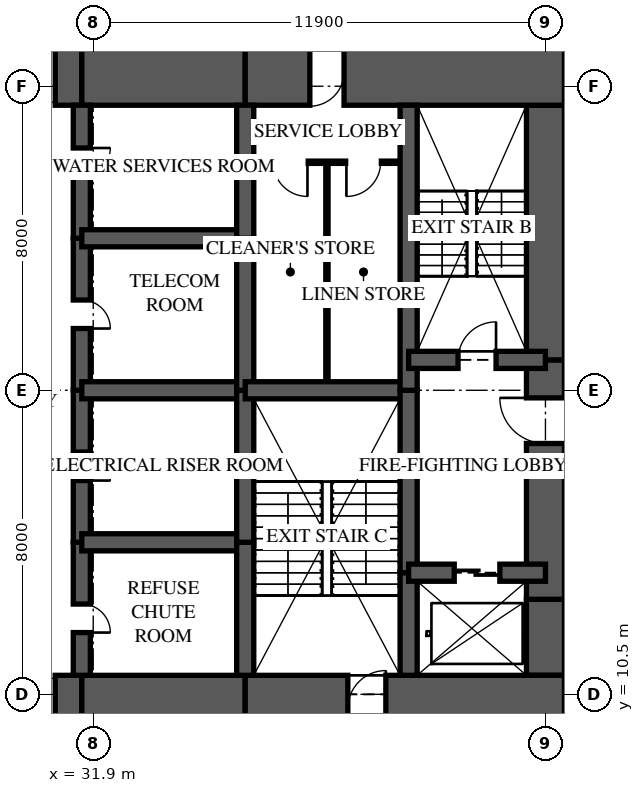
"""IFC4 building model, lengths in metres.
Left out: names, types, materials, properties, quantities, classifications, styles, units other than length and angle.
Written with IfcOpenShell. Run it as: python <this file> out.ifc"""

import sys

from ifc_helpers import new_model, si_unit, direction, frame, frame_2d, origin, place, context, subcontext, project, spatial, rectangle, extrude, element, fill, save


model = new_model("IFC4")
c1 = context("Model", 3, precision=1e-05, world=origin(), true_north=direction((0.0, 1.0)))
c2 = subcontext(c1, "Body", "Model", "MODEL_VIEW")
j1 = project(units=[si_unit("LENGTHUNIT", "METRE"), si_unit("PLANEANGLEUNIT", "RADIAN")], contexts=[c1])
p1 = place(None, origin())
s1 = spatial("IfcSite", under=j1, at=p1, CompositionType="ELEMENT")
p2 = place(p1, origin())
s2 = spatial("IfcBuilding", under=s1, at=p2, CompositionType="ELEMENT")
p3 = place(p2, frame((0.0, 0.0, 6.0)))
s3 = spatial("IfcBuildingStorey", under=s2, at=p3, CompositionType="ELEMENT", Elevation=6.0)
p4 = place(p3, frame((26.0, 10.125, 0.0), z_axis=(0.0, 0.0, 1.0), x_axis=(1.0, 0.0, 0.0)))
e1 = element("IfcWall", 1, at=p4, inside=s3, PredefinedType="SHEAR", context=c2, shape_type="SweptSolid", body=[
    extrude(rectangle(XDim=5.6, YDim=1.75, at=frame_2d((2.8, 0.0))), origin(), (0.0, 0.0, 1.0), 5.0),
])
p5 = place(p4, frame((3.3, 0.0, 0.0)))
e2 = element("IfcOpeningElement", 2, at=p5, cuts=e1, PredefinedType="OPENING", context=c2, shape_type="SweptSolid", body=[
    extrude(rectangle(XDim=1.6, YDim=2.1, at=frame_2d((0.8, 1.05))), frame((0.0, 0.885, 0.0), z_axis=(0.0, -1.0, 0.0), x_axis=(1.0, 0.0, 0.0)), (0.0, 0.0, 1.0), 1.77),
])
p6 = place(p3, frame((31.6, 10.125, 0.0), z_axis=(0.0, 0.0, 1.0), x_axis=(1.0, 0.0, 0.0)))
e3 = element("IfcWall", 3, at=p6, inside=s3, PredefinedType="SHEAR", context=c2, shape_type="SweptSolid", body=[
    extrude(rectangle(XDim=4.3, YDim=1.75, at=frame_2d((2.15, 0.0))), origin(), (0.0, 0.0, 1.0), 5.0),
])
p7 = place(p3, frame((35.9, 10.125, 0.0), z_axis=(0.0, 0.0, 1.0), x_axis=(1.0, 0.0, 0.0)))
e4 = element("IfcWall", 4, at=p7, inside=s3, PredefinedType="SHEAR", context=c2, shape_type="SweptSolid", body=[
    extrude(rectangle(XDim=8.4, YDim=1.75, at=frame_2d((4.2, 0.0))), origin(), (0.0, 0.0, 1.0), 5.0),
])
p8 = place(p7, frame((2.7, 0.0, 0.0)))
e5 = element("IfcOpeningElement", 5, at=p8, cuts=e4, PredefinedType="OPENING", context=c2, shape_type="SweptSolid", body=[
    extrude(rectangle(XDim=1.0, YDim=2.1, at=frame_2d((0.5, 1.05))), frame((0.0, 0.885, 0.0), z_axis=(0.0, -1.0, 0.0), x_axis=(1.0, 0.0, 0.0)), (0.0, 0.0, 1.0), 1.77),
])
p9 = place(p3, frame((44.3, 26.875, 0.0), z_axis=(0.0, 0.0, 1.0), x_axis=(-1.0, 0.0, 0.0)))
e6 = element("IfcWall", 6, at=p9, inside=s3, PredefinedType="SHEAR", context=c2, shape_type="SweptSolid", body=[
    extrude(rectangle(XDim=8.4, YDim=1.75, at=frame_2d((4.2, 0.0))), origin(), (0.0, 0.0, 1.0), 5.0),
])
p10 = place(p9, frame((5.8, 0.0, 0.0)))
e7 = element("IfcOpeningElement", 7, at=p10, cuts=e6, PredefinedType="OPENING", context=c2, shape_type="SweptSolid", body=[
    extrude(rectangle(XDim=0.9, YDim=2.1, at=frame_2d((0.45, 1.05))), frame((0.0, 0.885, 0.0), z_axis=(0.0, -1.0, 0.0), x_axis=(1.0, 0.0, 0.0)), (0.0, 0.0, 1.0), 1.77),
])
p11 = place(p3, frame((35.9, 26.875, 0.0), z_axis=(0.0, 0.0, 1.0), x_axis=(-1.0, 0.0, 0.0)))
e8 = element("IfcWall", 8, at=p11, inside=s3, PredefinedType="SHEAR", context=c2, shape_type="SweptSolid", body=[
    extrude(rectangle(XDim=4.3, YDim=1.75, at=frame_2d((2.15, 0.0))), origin(), (0.0, 0.0, 1.0), 5.0),
])
p12 = place(p3, frame((31.6, 26.875, 0.0), z_axis=(0.0, 0.0, 1.0), x_axis=(-1.0, 0.0, 0.0)))
e9 = element("IfcWall", 9, at=p12, inside=s3, PredefinedType="SHEAR", context=c2, shape_type="SweptSolid", body=[
    extrude(rectangle(XDim=5.6, YDim=1.75, at=frame_2d((2.8, 0.0))), origin(), (0.0, 0.0, 1.0), 5.0),
])
p13 = place(p12, frame((0.7, 0.0, 0.0)))
e10 = element("IfcOpeningElement", 10, at=p13, cuts=e9, PredefinedType="OPENING", context=c2, shape_type="SweptSolid", body=[
    extrude(rectangle(XDim=1.6, YDim=2.1, at=frame_2d((0.8, 1.05))), frame((0.0, 0.885, 0.0), z_axis=(0.0, -1.0, 0.0), x_axis=(1.0, 0.0, 0.0)), (0.0, 0.0, 1.0), 1.77),
])
p14 = place(p3, frame((43.8, 11.0, 0.0), z_axis=(0.0, 0.0, 1.0), x_axis=(0.0, 1.0, 0.0)))
e11 = element("IfcWall", 11, at=p14, inside=s3, PredefinedType="SHEAR", context=c2, shape_type="SweptSolid", body=[
    extrude(rectangle(XDim=2.0, YDim=1.0, at=frame_2d((1.0, 0.0))), origin(), (0.0, 0.0, 1.0), 5.0),
])
p15 = place(p3, frame((43.8, 13.0, 0.0), z_axis=(0.0, 0.0, 1.0), x_axis=(0.0, 1.0, 0.0)))
e12 = element("IfcWall", 12, at=p15, inside=s3, PredefinedType="SHEAR", context=c2, shape_type="SweptSolid", body=[
    extrude(rectangle(XDim=6.3, YDim=1.0, at=frame_2d((3.15, 0.0))), origin(), (0.0, 0.0, 1.0), 5.0),
])
p16 = place(p15, frame((4.1, 0.0, 0.0)))
e13 = element("IfcOpeningElement", 13, at=p16, cuts=e12, PredefinedType="OPENING", context=c2, shape_type="SweptSolid", body=[
    extrude(rectangle(XDim=1.2, YDim=2.2, at=frame_2d((0.6, 1.1))), frame((0.0, 0.51, 0.0), z_axis=(0.0, -1.0, 0.0), x_axis=(1.0, 0.0, 0.0)), (0.0, 0.0, 1.0), 1.02),
])
p17 = place(p3, frame((43.8, 19.3, 0.0), z_axis=(0.0, 0.0, 1.0), x_axis=(0.0, 1.0, 0.0)))
e14 = element("IfcWall", 14, at=p17, inside=s3, PredefinedType="SHEAR", context=c2, shape_type="SweptSolid", body=[
    extrude(rectangle(XDim=6.7, YDim=1.0, at=frame_2d((3.35, 0.0))), origin(), (0.0, 0.0, 1.0), 5.0),
])
p18 = place(p3, frame((31.6, 11.0, 0.0), z_axis=(0.0, 0.0, 1.0), x_axis=(0.0, 1.0, 0.0)))
e15 = element("IfcWall", 15, at=p18, inside=s3, PredefinedType="SHEAR", context=c2, shape_type="SweptSolid", body=[
    extrude(rectangle(XDim=3.5, YDim=0.45, at=frame_2d((1.75, 0.0))), origin(), (0.0, 0.0, 1.0), 5.0),
])
p19 = place(p18, frame((1.125, 0.0, 0.0)))
e16 = element("IfcOpeningElement", 16, at=p19, cuts=e15, PredefinedType="OPENING", context=c2, shape_type="SweptSolid", body=[
    extrude(rectangle(XDim=0.75, YDim=2.1, at=frame_2d((0.375, 1.05))), frame((0.0, 0.235, 0.0), z_axis=(0.0, -1.0, 0.0), x_axis=(1.0, 0.0, 0.0)), (0.0, 0.0, 1.0), 0.47),
])
p20 = place(p3, frame((31.6, 14.5, 0.0), z_axis=(0.0, 0.0, 1.0), x_axis=(0.0, 1.0, 0.0)))
e17 = element("IfcWall", 17, at=p20, inside=s3, PredefinedType="SHEAR", context=c2, shape_type="SweptSolid", body=[
    extrude(rectangle(XDim=4.0, YDim=0.45, at=frame_2d((2.0, 0.0))), origin(), (0.0, 0.0, 1.0), 5.0),
])
p21 = place(p20, frame((1.625, 0.0, 0.0)))
e18 = element("IfcOpeningElement", 18, at=p21, cuts=e17, PredefinedType="OPENING", context=c2, shape_type="SweptSolid", body=[
    extrude(rectangle(XDim=0.75, YDim=2.1, at=frame_2d((0.375, 1.05))), frame((0.0, 0.235, 0.0), z_axis=(0.0, -1.0, 0.0), x_axis=(1.0, 0.0, 0.0)), (0.0, 0.0, 1.0), 0.47),
])
p22 = place(p3, frame((31.6, 18.5, 0.0), z_axis=(0.0, 0.0, 1.0), x_axis=(0.0, 1.0, 0.0)))
e19 = element("IfcWall", 19, at=p22, inside=s3, PredefinedType="SHEAR", context=c2, shape_type="SweptSolid", body=[
    extrude(rectangle(XDim=4.0, YDim=0.45, at=frame_2d((2.0, 0.0))), origin(), (0.0, 0.0, 1.0), 5.0),
])
p23 = place(p22, frame((1.625, 0.0, 0.0)))
e20 = element("IfcOpeningElement", 20, at=p23, cuts=e19, PredefinedType="OPENING", context=c2, shape_type="SweptSolid", body=[
    extrude(rectangle(XDim=0.75, YDim=2.1, at=frame_2d((0.375, 1.05))), frame((0.0, 0.235, 0.0), z_axis=(0.0, -1.0, 0.0), x_axis=(1.0, 0.0, 0.0)), (0.0, 0.0, 1.0), 0.47),
])
p24 = place(p3, frame((31.6, 22.5, 0.0), z_axis=(0.0, 0.0, 1.0), x_axis=(0.0, 1.0, 0.0)))
e21 = element("IfcWall", 21, at=p24, inside=s3, PredefinedType="SHEAR", context=c2, shape_type="SweptSolid", body=[
    extrude(rectangle(XDim=3.5, YDim=0.45, at=frame_2d((1.75, 0.0))), origin(), (0.0, 0.0, 1.0), 5.0),
])
p25 = place(p24, frame((1.625, 0.0, 0.0)))
e22 = element("IfcOpeningElement", 22, at=p25, cuts=e21, PredefinedType="OPENING", context=c2, shape_type="SweptSolid", body=[
    extrude(rectangle(XDim=0.75, YDim=2.1, at=frame_2d((0.375, 1.05))), frame((0.0, 0.235, 0.0), z_axis=(0.0, -1.0, 0.0), x_axis=(1.0, 0.0, 0.0)), (0.0, 0.0, 1.0), 0.47),
])
p26 = place(p3, frame((35.9, 11.0, 0.0), z_axis=(0.0, 0.0, 1.0), x_axis=(0.0, 1.0, 0.0)))
e23 = element("IfcWall", 23, at=p26, inside=s3, PredefinedType="SHEAR", context=c2, shape_type="SweptSolid", body=[
    extrude(rectangle(XDim=3.5, YDim=0.45, at=frame_2d((1.75, 0.0))), origin(), (0.0, 0.0, 1.0), 5.0),
])
for number, where, z_axis, x_axis in (
    (24, (35.9, 14.5, 0.0), (0.0, 0.0, 1.0), (0.0, 1.0, 0.0)),
    (25, (35.9, 18.5, 0.0), (0.0, 0.0, 1.0), (0.0, 1.0, 0.0)),
):
    element("IfcWall", number, at=place(p3, frame(where, z_axis=z_axis, x_axis=x_axis)), inside=s3, PredefinedType="SHEAR", context=c2, shape_type="SweptSolid", body=[
        extrude(rectangle(XDim=4.0, YDim=0.45, at=frame_2d((2.0, 0.0))), origin(), (0.0, 0.0, 1.0), 5.0),
    ])
p27 = place(p3, frame((35.9, 22.5, 0.0), z_axis=(0.0, 0.0, 1.0), x_axis=(0.0, 1.0, 0.0)))
e26 = element("IfcWall", 26, at=p27, inside=s3, PredefinedType="SHEAR", context=c2, shape_type="SweptSolid", body=[
    extrude(rectangle(XDim=3.5, YDim=0.45, at=frame_2d((1.75, 0.0))), origin(), (0.0, 0.0, 1.0), 5.0),
])
p28 = place(p3, frame((40.2, 11.0, 0.0), z_axis=(0.0, 0.0, 1.0), x_axis=(0.0, 1.0, 0.0)))
e27 = element("IfcWall", 27, at=p28, inside=s3, PredefinedType="SHEAR", context=c2, shape_type="SweptSolid", body=[
    extrude(rectangle(XDim=2.7, YDim=0.45, at=frame_2d((1.35, 0.0))), origin(), (0.0, 0.0, 1.0), 5.0),
])
p29 = place(p3, frame((40.2, 13.7, 0.0), z_axis=(0.0, 0.0, 1.0), x_axis=(0.0, 1.0, 0.0)))
e28 = element("IfcWall", 28, at=p29, inside=s3, PredefinedType="SHEAR", context=c2, shape_type="SweptSolid", body=[
    extrude(rectangle(XDim=4.8, YDim=0.45, at=frame_2d((2.4, 0.0))), origin(), (0.0, 0.0, 1.0), 5.0),
])
p30 = place(p3, frame((40.2, 18.5, 0.0), z_axis=(0.0, 0.0, 1.0), x_axis=(0.0, 1.0, 0.0)))
e29 = element("IfcWall", 29, at=p30, inside=s3, PredefinedType="SHEAR", context=c2, shape_type="SweptSolid", body=[
    extrude(rectangle(XDim=7.5, YDim=0.45, at=frame_2d((3.75, 0.0))), origin(), (0.0, 0.0, 1.0), 5.0),
])
for number, where, z_axis, x_axis in (
    (30, (31.6, 14.5, 0.0), (0.0, 0.0, 1.0), (1.0, 0.0, 0.0)),
    (31, (31.6, 18.5, 0.0), (0.0, 0.0, 1.0), (1.0, 0.0, 0.0)),
    (32, (31.6, 22.5, 0.0), (0.0, 0.0, 1.0), (1.0, 0.0, 0.0)),
):
    element("IfcWall", number, at=place(p3, frame(where, z_axis=z_axis, x_axis=x_axis)), inside=s3, PredefinedType="SHEAR", context=c2, shape_type="SweptSolid", body=[
        extrude(rectangle(XDim=4.3, YDim=0.45, at=frame_2d((2.15, 0.0))), origin(), (0.0, 0.0, 1.0), 5.0),
    ])
p31 = place(p3, frame((35.9, 18.5, 0.0), z_axis=(0.0, 0.0, 1.0), x_axis=(1.0, 0.0, 0.0)))
e33 = element("IfcWall", 33, at=p31, inside=s3, PredefinedType="SHEAR", context=c2, shape_type="SweptSolid", body=[
    extrude(rectangle(XDim=4.3, YDim=0.45, at=frame_2d((2.15, 0.0))), origin(), (0.0, 0.0, 1.0), 5.0),
])
p32 = place(p3, frame((40.2, 13.7, 0.0), z_axis=(0.0, 0.0, 1.0), x_axis=(1.0, 0.0, 0.0)))
e34 = element("IfcWall", 34, at=p32, inside=s3, PredefinedType="SHEAR", context=c2, shape_type="SweptSolid", body=[
    extrude(rectangle(XDim=3.6, YDim=0.45, at=frame_2d((1.8, 0.0))), origin(), (0.0, 0.0, 1.0), 5.0),
])
p33 = place(p32, frame((1.2, 0.0, 0.0)))
e35 = element("IfcOpeningElement", 35, at=p33, cuts=e34, PredefinedType="OPENING", context=c2, shape_type="SweptSolid", body=[
    extrude(rectangle(XDim=1.2, YDim=2.1, at=frame_2d((0.6, 1.05))), frame((0.0, 0.235, 0.0), z_axis=(0.0, -1.0, 0.0), x_axis=(1.0, 0.0, 0.0)), (0.0, 0.0, 1.0), 0.47),
])
p34 = place(p3, frame((40.2, 19.3, 0.0), z_axis=(0.0, 0.0, 1.0), x_axis=(1.0, 0.0, 0.0)))
e36 = element("IfcWall", 36, at=p34, inside=s3, PredefinedType="SHEAR", context=c2, shape_type="SweptSolid", body=[
    extrude(rectangle(XDim=3.6, YDim=0.45, at=frame_2d((1.8, 0.0))), origin(), (0.0, 0.0, 1.0), 5.0),
])
p35 = place(p34, frame((1.3, 0.0, 0.0)))
e37 = element("IfcOpeningElement", 37, at=p35, cuts=e36, PredefinedType="OPENING", context=c2, shape_type="SweptSolid", body=[
    extrude(rectangle(XDim=1.0, YDim=2.1, at=frame_2d((0.5, 1.05))), frame((0.0, 0.235, 0.0), z_axis=(0.0, -1.0, 0.0), x_axis=(1.0, 0.0, 0.0)), (0.0, 0.0, 1.0), 0.47),
])
p36 = place(p3, frame((36.125, 24.5, 0.0), z_axis=(0.0, 0.0, 1.0), x_axis=(1.0, 0.0, 0.0)))
e38 = element("IfcWall", 38, at=p36, inside=s3, PredefinedType="PARTITIONING", context=c2, shape_type="SweptSolid", body=[
    extrude(rectangle(XDim=3.85, YDim=0.1, at=frame_2d((1.925, 0.0))), origin(), (0.0, 0.0, 1.0), 4.72),
])
p37 = place(p36, frame((0.512, 0.0, 0.0)))
e39 = element("IfcOpeningElement", 39, at=p37, cuts=e38, PredefinedType="OPENING", context=c2, shape_type="SweptSolid", body=[
    extrude(rectangle(XDim=0.9, YDim=2.1, at=frame_2d((0.45, 1.05))), frame((0.0, 0.06, 0.0), z_axis=(0.0, -1.0, 0.0), x_axis=(1.0, 0.0, 0.0)), (0.0, 0.0, 1.0), 0.12),
])
p38 = place(p36, frame((2.438, 0.0, 0.0)))
e40 = element("IfcOpeningElement", 40, at=p38, cuts=e38, PredefinedType="OPENING", context=c2, shape_type="SweptSolid", body=[
    extrude(rectangle(XDim=0.9, YDim=2.1, at=frame_2d((0.45, 1.05))), frame((0.0, 0.06, 0.0), z_axis=(0.0, -1.0, 0.0), x_axis=(1.0, 0.0, 0.0)), (0.0, 0.0, 1.0), 0.12),
])
p39 = place(p3, frame((38.05, 18.725, 0.0), z_axis=(0.0, 0.0, 1.0), x_axis=(0.0, 1.0, 0.0)))
e41 = element("IfcWall", 41, at=p39, inside=s3, PredefinedType="PARTITIONING", context=c2, shape_type="SweptSolid", body=[
    extrude(rectangle(XDim=5.725, YDim=0.1, at=frame_2d((2.862, 0.0))), origin(), (0.0, 0.0, 1.0), 4.72),
])
p40 = place(p37, frame((0.9, 0.0, 0.0), z_axis=(0.0, 0.0, 1.0), x_axis=(-1.0, 0.0, 0.0)))
e42 = element("IfcDoor", 42, at=p40, inside=s3, OperationType="SINGLE_SWING_LEFT", PredefinedType="DOOR", context=c2, shape_type="SweptSolid", body=[
    extrude(rectangle(XDim=0.9, YDim=2.1, at=frame_2d((0.45, 1.05))), frame((0.0, 0.025, 0.0), z_axis=(0.0, -1.0, 0.0), x_axis=(1.0, 0.0, 0.0)), (0.0, 0.0, 1.0), 0.05),
])
fill(e39, e42)
p41 = place(p38, frame((0.9, 0.0, 0.0), z_axis=(0.0, 0.0, 1.0), x_axis=(-1.0, 0.0, 0.0)))
e43 = element("IfcDoor", 43, at=p41, inside=s3, OperationType="SINGLE_SWING_RIGHT", PredefinedType="DOOR", context=c2, shape_type="SweptSolid", body=[
    extrude(rectangle(XDim=0.9, YDim=2.1, at=frame_2d((0.45, 1.05))), frame((0.0, 0.025, 0.0), z_axis=(0.0, -1.0, 0.0), x_axis=(1.0, 0.0, 0.0)), (0.0, 0.0, 1.0), 0.05),
])
fill(e40, e43)
p42 = place(p35, origin())
e44 = element("IfcDoor", 44, at=p42, inside=s3, OperationType="SINGLE_SWING_RIGHT", PredefinedType="DOOR", context=c2, shape_type="SweptSolid", body=[
    extrude(rectangle(XDim=1.0, YDim=2.1, at=frame_2d((0.5, 1.05))), frame((0.0, 0.025, 0.0), z_axis=(0.0, -1.0, 0.0), x_axis=(1.0, 0.0, 0.0)), (0.0, 0.0, 1.0), 0.05),
])
fill(e37, e44)
p43 = place(p16, origin())
e45 = element("IfcDoor", 45, at=p43, inside=s3, OperationType="SINGLE_SWING_RIGHT", PredefinedType="DOOR", context=c2, shape_type="SweptSolid", body=[
    extrude(rectangle(XDim=1.2, YDim=2.2, at=frame_2d((0.6, 1.1))), frame((0.0, 0.025, 0.0), z_axis=(0.0, -1.0, 0.0), x_axis=(1.0, 0.0, 0.0)), (0.0, 0.0, 1.0), 0.05),
])
fill(e13, e45)
p44 = place(p33, origin())
e46 = element("IfcDoor", 46, at=p44, inside=s3, OperationType="SLIDING_TO_LEFT", PredefinedType="DOOR", context=c2, shape_type="SweptSolid", body=[
    extrude(rectangle(XDim=1.2, YDim=2.1, at=frame_2d((0.6, 1.05))), frame((0.0, 0.025, 0.0), z_axis=(0.0, -1.0, 0.0), x_axis=(1.0, 0.0, 0.0)), (0.0, 0.0, 1.0), 0.05),
])
fill(e35, e46)
p45 = place(p5, origin())
e47 = element("IfcDoor", 47, at=p45, inside=s3, OperationType="DOUBLE_DOOR_SINGLE_SWING", PredefinedType="DOOR", context=c2, shape_type="SweptSolid", body=[
    extrude(rectangle(XDim=1.6, YDim=2.1, at=frame_2d((0.8, 1.05))), frame((0.0, 0.025, 0.0), z_axis=(0.0, -1.0, 0.0), x_axis=(1.0, 0.0, 0.0)), (0.0, 0.0, 1.0), 0.05),
])
fill(e2, e47)
p46 = place(p13, origin())
e48 = element("IfcDoor", 48, at=p46, inside=s3, OperationType="DOUBLE_DOOR_SINGLE_SWING", PredefinedType="DOOR", context=c2, shape_type="SweptSolid", body=[
    extrude(rectangle(XDim=1.6, YDim=2.1, at=frame_2d((0.8, 1.05))), frame((0.0, 0.025, 0.0), z_axis=(0.0, -1.0, 0.0), x_axis=(1.0, 0.0, 0.0)), (0.0, 0.0, 1.0), 0.05),
])
fill(e10, e48)
p47 = place(p19, frame((0.75, 0.0, 0.0), z_axis=(0.0, 0.0, 1.0), x_axis=(-1.0, 0.0, 0.0)))
e49 = element("IfcDoor", 49, at=p47, inside=s3, OperationType="SINGLE_SWING_RIGHT", PredefinedType="DOOR", context=c2, shape_type="SweptSolid", body=[
    extrude(rectangle(XDim=0.75, YDim=2.1, at=frame_2d((0.375, 1.05))), frame((0.0, 0.025, 0.0), z_axis=(0.0, -1.0, 0.0), x_axis=(1.0, 0.0, 0.0)), (0.0, 0.0, 1.0), 0.05),
])
fill(e16, e49)
p48 = place(p21, frame((0.75, 0.0, 0.0), z_axis=(0.0, 0.0, 1.0), x_axis=(-1.0, 0.0, 0.0)))
e50 = element("IfcDoor", 50, at=p48, inside=s3, OperationType="SINGLE_SWING_RIGHT", PredefinedType="DOOR", context=c2, shape_type="SweptSolid", body=[
    extrude(rectangle(XDim=0.75, YDim=2.1, at=frame_2d((0.375, 1.05))), frame((0.0, 0.025, 0.0), z_axis=(0.0, -1.0, 0.0), x_axis=(1.0, 0.0, 0.0)), (0.0, 0.0, 1.0), 0.05),
])
fill(e18, e50)
p49 = place(p23, frame((0.75, 0.0, 0.0), z_axis=(0.0, 0.0, 1.0), x_axis=(-1.0, 0.0, 0.0)))
e51 = element("IfcDoor", 51, at=p49, inside=s3, OperationType="SINGLE_SWING_RIGHT", PredefinedType="DOOR", context=c2, shape_type="SweptSolid", body=[
    extrude(rectangle(XDim=0.75, YDim=2.1, at=frame_2d((0.375, 1.05))), frame((0.0, 0.025, 0.0), z_axis=(0.0, -1.0, 0.0), x_axis=(1.0, 0.0, 0.0)), (0.0, 0.0, 1.0), 0.05),
])
fill(e20, e51)
p50 = place(p25, frame((0.75, 0.0, 0.0), z_axis=(0.0, 0.0, 1.0), x_axis=(-1.0, 0.0, 0.0)))
e52 = element("IfcDoor", 52, at=p50, inside=s3, OperationType="SINGLE_SWING_LEFT", PredefinedType="DOOR", context=c2, shape_type="SweptSolid", body=[
    extrude(rectangle(XDim=0.75, YDim=2.1, at=frame_2d((0.375, 1.05))), frame((0.0, 0.025, 0.0), z_axis=(0.0, -1.0, 0.0), x_axis=(1.0, 0.0, 0.0)), (0.0, 0.0, 1.0), 0.05),
])
fill(e22, e52)
p51 = place(p8, origin())
e53 = element("IfcDoor", 53, at=p51, inside=s3, OperationType="SINGLE_SWING_RIGHT", PredefinedType="DOOR", context=c2, shape_type="SweptSolid", body=[
    extrude(rectangle(XDim=1.0, YDim=2.1, at=frame_2d((0.5, 1.05))), frame((0.0, 0.025, 0.0), z_axis=(0.0, -1.0, 0.0), x_axis=(1.0, 0.0, 0.0)), (0.0, 0.0, 1.0), 0.05),
])
fill(e5, e53)
p52 = place(p10, origin())
e54 = element("IfcDoor", 54, at=p52, inside=s3, OperationType="SINGLE_SWING_RIGHT", PredefinedType="DOOR", context=c2, shape_type="SweptSolid", body=[
    extrude(rectangle(XDim=0.9, YDim=2.1, at=frame_2d((0.45, 1.05))), frame((0.0, 0.47, 0.0), z_axis=(0.0, -1.0, 0.0), x_axis=(1.0, 0.0, 0.0)), (0.0, 0.0, 1.0), 0.8),
])
fill(e7, e54)
save(model, sys.argv[1])
